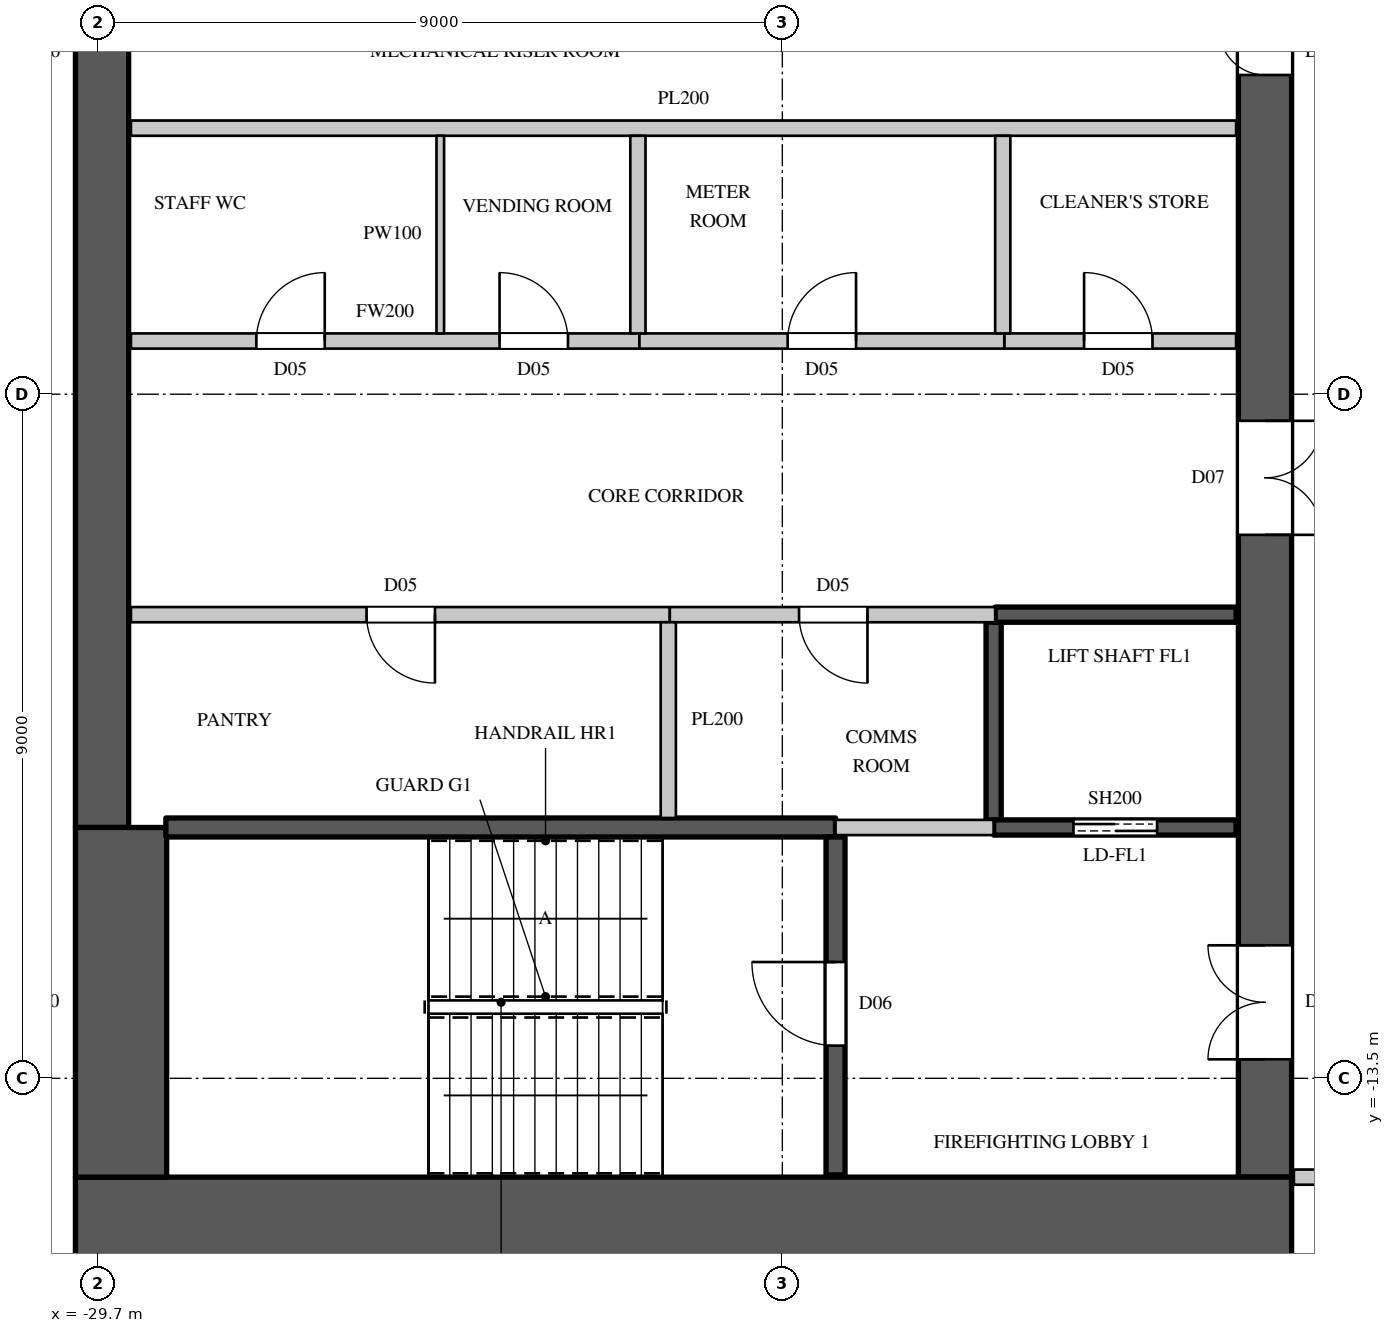
"""IFC4 building model, lengths in metres.
Left out: names, types, materials, properties, quantities, classifications, styles, units other than length and angle.
Written with IfcOpenShell. Run it as: python <this file> out.ifc"""

import sys

from ifc_helpers import new_model, si_unit, direction, frame, frame_2d, origin, place, context, subcontext, project, spatial, rectangle, extrude, element, fill, save


model = new_model("IFC4")
c1 = context("Model", 3, precision=1e-05, world=origin(), true_north=direction((0.0, 1.0)))
c2 = subcontext(c1, "Body", "Model", "MODEL_VIEW")
j1 = project(units=[si_unit("LENGTHUNIT", "METRE"), si_unit("PLANEANGLEUNIT", "RADIAN")], contexts=[c1])
p1 = place(None, origin())
s1 = spatial("IfcSite", under=j1, at=p1, CompositionType="ELEMENT")
p2 = place(p1, origin())
s2 = spatial("IfcBuilding", under=s1, at=p2, CompositionType="ELEMENT")
p3 = place(p2, frame((0.0, 0.0, 317.2)))
s3 = spatial("IfcBuildingStorey", under=s2, at=p3, CompositionType="ELEMENT", Elevation=317.2)
p4 = place(p3, frame((-30.0, -15.4, 0.0), z_axis=(0.0, 0.0, 1.0), x_axis=(1.0, 0.0, 0.0)))
e1 = element("IfcWall", 1, at=p4, inside=s3, PredefinedType="SHEAR", context=c2, shape_type="SweptSolid", body=[
    extrude(rectangle(XDim=16.0, YDim=1.2, at=frame_2d((8.0, 0.0))), origin(), (0.0, 0.0, 1.0), 4.1),
])
p5 = place(p3, frame((-14.35, -14.8, 0.0), z_axis=(0.0, 0.0, 1.0), x_axis=(0.0, 1.0, 0.0)))
e2 = element("IfcWall", 2, at=p5, inside=s3, PredefinedType="SHEAR", context=c2, shape_type="SweptSolid", body=[
    extrude(rectangle(XDim=29.6, YDim=0.7, at=frame_2d((14.8, 0.0))), origin(), (0.0, 0.0, 1.0), 4.1),
])
p6 = place(p5, frame((1.55, 0.0, 0.0)))
e3 = element("IfcOpeningElement", 3, at=p6, cuts=e2, PredefinedType="OPENING", context=c2, shape_type="SweptSolid", body=[
    extrude(rectangle(XDim=1.5, YDim=2.4, at=frame_2d((0.75, 1.2))), frame((0.0, 0.36, 0.0), z_axis=(0.0, -1.0, 0.0), x_axis=(1.0, 0.0, 0.0)), (0.0, 0.0, 1.0), 0.72),
])
p7 = place(p5, frame((26.55, 0.0, 0.0)))
e4 = element("IfcOpeningElement", 4, at=p7, cuts=e2, PredefinedType="OPENING", context=c2, shape_type="SweptSolid", body=[
    extrude(rectangle(XDim=1.5, YDim=2.4, at=frame_2d((0.75, 1.2))), frame((0.0, 0.36, 0.0), z_axis=(0.0, -1.0, 0.0), x_axis=(1.0, 0.0, 0.0)), (0.0, 0.0, 1.0), 0.72),
])
p8 = place(p5, frame((8.45, 0.0, 0.0)))
e5 = element("IfcOpeningElement", 5, at=p8, cuts=e2, PredefinedType="OPENING", context=c2, shape_type="SweptSolid", body=[
    extrude(rectangle(XDim=1.5, YDim=2.4, at=frame_2d((0.75, 1.2))), frame((0.0, 0.36, 0.0), z_axis=(0.0, -1.0, 0.0), x_axis=(1.0, 0.0, 0.0)), (0.0, 0.0, 1.0), 0.72),
])
p9 = place(p5, frame((19.65, 0.0, 0.0)))
e6 = element("IfcOpeningElement", 6, at=p9, cuts=e2, PredefinedType="OPENING", context=c2, shape_type="SweptSolid", body=[
    extrude(rectangle(XDim=1.5, YDim=2.4, at=frame_2d((0.75, 1.2))), frame((0.0, 0.36, 0.0), z_axis=(0.0, -1.0, 0.0), x_axis=(1.0, 0.0, 0.0)), (0.0, 0.0, 1.0), 0.72),
])
p10 = place(p5, frame((14.5, 0.0, 0.0)))
e7 = element("IfcOpeningElement", 7, at=p10, cuts=e2, PredefinedType="OPENING", context=c2, shape_type="SweptSolid", body=[
    extrude(rectangle(XDim=0.6, YDim=2.0, at=frame_2d((0.3, 1.0))), frame((0.0, 0.36, 0.0), z_axis=(0.0, -1.0, 0.0), x_axis=(1.0, 0.0, 0.0)), (0.0, 0.0, 1.0), 0.72),
])
p11 = place(p3, frame((-29.65, -10.2, 0.0), z_axis=(0.0, 0.0, 1.0), x_axis=(0.0, 1.0, 0.0)))
e8 = element("IfcWall", 8, at=p11, inside=s3, PredefinedType="SHEAR", context=c2, shape_type="SweptSolid", body=[
    extrude(rectangle(XDim=20.4, YDim=0.7, at=frame_2d((10.2, 0.0))), origin(), (0.0, 0.0, 1.0), 4.1),
])
p12 = place(p3, frame((-29.4, -14.8, 0.0), z_axis=(0.0, 0.0, 1.0), x_axis=(0.0, 1.0, 0.0)))
e9 = element("IfcWall", 9, at=p12, inside=s3, PredefinedType="SHEAR", context=c2, shape_type="SweptSolid", body=[
    extrude(rectangle(XDim=4.6, YDim=1.2, at=frame_2d((2.3, 0.0))), origin(), (0.0, 0.0, 1.0), 4.1),
])
p13 = place(p3, frame((-29.27, -7.4, 0.0), z_axis=(0.0, 0.0, 1.0), x_axis=(1.0, 0.0, 0.0)))
e10 = element("IfcWall", 10, at=p13, inside=s3, PredefinedType="PARTITIONING", context=c2, shape_type="SweptSolid", body=[
    extrude(rectangle(XDim=7.09, YDim=0.2, at=frame_2d((3.545, 0.0))), origin(), (0.0, 0.0, 1.0), 3.8),
])
p14 = place(p13, frame((3.1, 0.0, 0.0)))
e11 = element("IfcOpeningElement", 11, at=p14, cuts=e10, PredefinedType="OPENING", context=c2, shape_type="SweptSolid", body=[
    extrude(rectangle(XDim=0.9, YDim=2.2, at=frame_2d((0.45, 1.1))), frame((0.0, 0.11, 0.0), z_axis=(0.0, -1.0, 0.0), x_axis=(1.0, 0.0, 0.0)), (0.0, 0.0, 1.0), 0.22),
])
p15 = place(p3, frame((-29.27, -3.8, 0.0), z_axis=(0.0, 0.0, 1.0), x_axis=(1.0, 0.0, 0.0)))
e12 = element("IfcWall", 12, at=p15, inside=s3, PredefinedType="PARTITIONING", context=c2, shape_type="SweptSolid", body=[
    extrude(rectangle(XDim=6.69, YDim=0.2, at=frame_2d((3.345, 0.0))), origin(), (0.0, 0.0, 1.0), 3.8),
])
p16 = place(p15, frame((1.65, 0.0, 0.0)))
e13 = element("IfcOpeningElement", 13, at=p16, cuts=e12, PredefinedType="OPENING", context=c2, shape_type="SweptSolid", body=[
    extrude(rectangle(XDim=0.9, YDim=2.2, at=frame_2d((0.45, 1.1))), frame((0.0, 0.11, 0.0), z_axis=(0.0, -1.0, 0.0), x_axis=(1.0, 0.0, 0.0)), (0.0, 0.0, 1.0), 0.22),
])
p17 = place(p15, frame((4.85, 0.0, 0.0)))
e14 = element("IfcOpeningElement", 14, at=p17, cuts=e12, PredefinedType="OPENING", context=c2, shape_type="SweptSolid", body=[
    extrude(rectangle(XDim=0.9, YDim=2.2, at=frame_2d((0.45, 1.1))), frame((0.0, 0.11, 0.0), z_axis=(0.0, -1.0, 0.0), x_axis=(1.0, 0.0, 0.0)), (0.0, 0.0, 1.0), 0.22),
])
p18 = place(p3, frame((-17.78, -3.8, 0.0), z_axis=(0.0, 0.0, 1.0), x_axis=(1.0, 0.0, 0.0)))
e15 = element("IfcWall", 15, at=p18, inside=s3, PredefinedType="PARTITIONING", context=c2, shape_type="SweptSolid", body=[
    extrude(rectangle(XDim=3.05, YDim=0.2, at=frame_2d((1.525, 0.0))), origin(), (0.0, 0.0, 1.0), 3.8),
])
p19 = place(p18, frame((1.05, 0.0, 0.0)))
e16 = element("IfcOpeningElement", 16, at=p19, cuts=e15, PredefinedType="OPENING", context=c2, shape_type="SweptSolid", body=[
    extrude(rectangle(XDim=0.9, YDim=2.2, at=frame_2d((0.45, 1.1))), frame((0.0, 0.11, 0.0), z_axis=(0.0, -1.0, 0.0), x_axis=(1.0, 0.0, 0.0)), (0.0, 0.0, 1.0), 0.22),
])
p20 = place(p3, frame((-13.97, -14.8, 0.0), z_axis=(0.0, 0.0, 1.0), x_axis=(1.0, 0.0, 0.0)))
e17 = element("IfcWall", 17, at=p20, inside=s3, PredefinedType="PARTITIONING", context=c2, shape_type="SweptSolid", body=[
    extrude(rectangle(XDim=2.87, YDim=0.2, at=frame_2d((1.435, 0.0))), origin(), (0.0, 0.0, 1.0), 3.8),
])
p21 = place(p3, frame((-29.27, -1.0, 0.0), z_axis=(0.0, 0.0, 1.0), x_axis=(1.0, 0.0, 0.0)))
e18 = element("IfcWall", 18, at=p21, inside=s3, PredefinedType="PARTITIONING", context=c2, shape_type="SweptSolid", body=[
    extrude(rectangle(XDim=14.54, YDim=0.2, at=frame_2d((7.27, 0.0))), origin(), (0.0, 0.0, 1.0), 3.8),
])
p22 = place(p3, frame((-22.58, -3.8, 0.0), z_axis=(0.0, 0.0, 1.0), x_axis=(1.0, 0.0, 0.0)))
e19 = element("IfcWall", 19, at=p22, inside=s3, PredefinedType="PARTITIONING", context=c2, shape_type="SweptSolid", body=[
    extrude(rectangle(XDim=4.8, YDim=0.2, at=frame_2d((2.4, 0.0))), origin(), (0.0, 0.0, 1.0), 3.8),
])
p23 = place(p22, frame((1.95, 0.0, 0.0)))
e20 = element("IfcOpeningElement", 20, at=p23, cuts=e19, PredefinedType="OPENING", context=c2, shape_type="SweptSolid", body=[
    extrude(rectangle(XDim=0.9, YDim=2.2, at=frame_2d((0.45, 1.1))), frame((0.0, 0.11, 0.0), z_axis=(0.0, -1.0, 0.0), x_axis=(1.0, 0.0, 0.0)), (0.0, 0.0, 1.0), 0.22),
])
p24 = place(p3, frame((-22.6, -3.7, 0.0), z_axis=(0.0, 0.0, 1.0), x_axis=(0.0, 1.0, 0.0)))
e21 = element("IfcWall", 21, at=p24, inside=s3, PredefinedType="PARTITIONING", context=c2, shape_type="SweptSolid", body=[
    extrude(rectangle(XDim=2.6, YDim=0.2, at=frame_2d((1.3, 0.0))), origin(), (0.0, 0.0, 1.0), 3.8),
])
p25 = place(p3, frame((-22.18, -7.4, 0.0), z_axis=(0.0, 0.0, 1.0), x_axis=(1.0, 0.0, 0.0)))
e22 = element("IfcWall", 22, at=p25, inside=s3, PredefinedType="PARTITIONING", context=c2, shape_type="SweptSolid", body=[
    extrude(rectangle(XDim=4.28, YDim=0.2, at=frame_2d((2.14, 0.0))), origin(), (0.0, 0.0, 1.0), 3.8),
])
p26 = place(p25, frame((1.7, 0.0, 0.0)))
e23 = element("IfcOpeningElement", 23, at=p26, cuts=e22, PredefinedType="OPENING", context=c2, shape_type="SweptSolid", body=[
    extrude(rectangle(XDim=0.9, YDim=2.2, at=frame_2d((0.45, 1.1))), frame((0.0, 0.11, 0.0), z_axis=(0.0, -1.0, 0.0), x_axis=(1.0, 0.0, 0.0)), (0.0, 0.0, 1.0), 0.22),
])
p27 = place(p3, frame((-22.2, -10.075, 0.0), z_axis=(0.0, 0.0, 1.0), x_axis=(0.0, 1.0, 0.0)))
e24 = element("IfcWall", 24, at=p27, inside=s3, PredefinedType="PARTITIONING", context=c2, shape_type="SweptSolid", body=[
    extrude(rectangle(XDim=2.575, YDim=0.2, at=frame_2d((1.288, 0.0))), origin(), (0.0, 0.0, 1.0), 3.8),
])
p28 = place(p3, frame((-20.0, -10.2, 0.0), z_axis=(0.0, 0.0, 1.0), x_axis=(1.0, 0.0, 0.0)))
e25 = element("IfcWall", 25, at=p28, inside=s3, PredefinedType="PARTITIONING", context=c2, shape_type="SweptSolid", body=[
    extrude(rectangle(XDim=2.08, YDim=0.2, at=frame_2d((1.04, 0.0))), origin(), (0.0, 0.0, 1.0), 3.8),
])
p29 = place(p3, frame((-17.8, -3.7, 0.0), z_axis=(0.0, 0.0, 1.0), x_axis=(0.0, 1.0, 0.0)))
e26 = element("IfcWall", 26, at=p29, inside=s3, PredefinedType="PARTITIONING", context=c2, shape_type="SweptSolid", body=[
    extrude(rectangle(XDim=2.6, YDim=0.2, at=frame_2d((1.3, 0.0))), origin(), (0.0, 0.0, 1.0), 3.8),
])
p30 = place(p3, frame((-17.92, -10.1, 0.0), z_axis=(0.0, 0.0, 1.0), x_axis=(0.0, 1.0, 0.0)))
e27 = element("IfcWall", 27, at=p30, inside=s3, PredefinedType="SHEAR", context=c2, shape_type="SweptSolid", body=[
    extrude(rectangle(XDim=2.6, YDim=0.2, at=frame_2d((1.3, 0.0))), origin(), (0.0, 0.0, 1.0), 3.8),
])
p31 = place(p3, frame((-17.92, -10.2, 0.0), z_axis=(0.0, 0.0, 1.0), x_axis=(1.0, 0.0, 0.0)))
e28 = element("IfcWall", 28, at=p31, inside=s3, PredefinedType="SHEAR", context=c2, shape_type="SweptSolid", body=[
    extrude(rectangle(XDim=3.19, YDim=0.2, at=frame_2d((1.595, 0.0))), origin(), (0.0, 0.0, 1.0), 3.8),
])
p32 = place(p31, frame((1.05, 0.0, 0.0)))
e29 = element("IfcOpeningElement", 29, at=p32, cuts=e28, PredefinedType="OPENING", context=c2, shape_type="SweptSolid", body=[
    extrude(rectangle(XDim=1.1, YDim=2.2, at=frame_2d((0.55, 1.1))), frame((0.0, 0.11, 0.0), z_axis=(0.0, -1.0, 0.0), x_axis=(1.0, 0.0, 0.0)), (0.0, 0.0, 1.0), 0.22),
])
p33 = place(p3, frame((-17.9, -7.4, 0.0), z_axis=(0.0, 0.0, 1.0), x_axis=(1.0, 0.0, 0.0)))
e30 = element("IfcWall", 30, at=p33, inside=s3, PredefinedType="SHEAR", context=c2, shape_type="SweptSolid", body=[
    extrude(rectangle(XDim=3.17, YDim=0.2, at=frame_2d((1.585, 0.0))), origin(), (0.0, 0.0, 1.0), 3.8),
])
p34 = place(p3, frame((-28.81, -10.2, 0.0), z_axis=(0.0, 0.0, 1.0), x_axis=(1.0, 0.0, 0.0)))
e31 = element("IfcWall", 31, at=p34, inside=s3, PredefinedType="SHEAR", context=c2, shape_type="SweptSolid", body=[
    extrude(rectangle(XDim=8.81, YDim=0.25, at=frame_2d((4.405, 0.0))), origin(), (0.0, 0.0, 1.0), 3.8),
])
p35 = place(p3, frame((-20.0, -14.77, 0.0), z_axis=(0.0, 0.0, 1.0), x_axis=(0.0, 1.0, 0.0)))
e32 = element("IfcWall", 32, at=p35, inside=s3, PredefinedType="SHEAR", context=c2, shape_type="SweptSolid", body=[
    extrude(rectangle(XDim=4.445, YDim=0.25, at=frame_2d((2.223, 0.0))), origin(), (0.0, 0.0, 1.0), 3.8),
])
p36 = place(p35, frame((1.7, 0.0, 0.0)))
e33 = element("IfcOpeningElement", 33, at=p36, cuts=e32, PredefinedType="OPENING", context=c2, shape_type="SweptSolid", body=[
    extrude(rectangle(XDim=1.1, YDim=2.2, at=frame_2d((0.55, 1.1))), frame((0.0, 0.135, 0.0), z_axis=(0.0, -1.0, 0.0), x_axis=(1.0, 0.0, 0.0)), (0.0, 0.0, 1.0), 0.27),
])
p37 = place(p3, frame((-25.2, -3.7, 0.0), z_axis=(0.0, 0.0, 1.0), x_axis=(0.0, 1.0, 0.0)))
e34 = element("IfcWall", 34, at=p37, inside=s3, PredefinedType="PARTITIONING", context=c2, shape_type="SweptSolid", body=[
    extrude(rectangle(XDim=2.6, YDim=0.1, at=frame_2d((1.3, 0.0))), origin(), (0.0, 0.0, 1.0), 3.8),
])
p38 = place(p36, origin())
e35 = element("IfcDoor", 35, at=p38, inside=s3, OperationType="SINGLE_SWING_RIGHT", PredefinedType="DOOR", context=c2, shape_type="SweptSolid", body=[
    extrude(rectangle(XDim=1.1, YDim=2.2, at=frame_2d((0.55, 1.1))), frame((0.0, 0.025, 0.0), z_axis=(0.0, -1.0, 0.0), x_axis=(1.0, 0.0, 0.0)), (0.0, 0.0, 1.0), 0.05),
])
fill(e33, e35)
p39 = place(p14, origin())
e36 = element("IfcDoor", 36, at=p39, inside=s3, OperationType="SINGLE_SWING_LEFT", PredefinedType="DOOR", context=c2, shape_type="SweptSolid", body=[
    extrude(rectangle(XDim=0.9, YDim=2.2, at=frame_2d((0.45, 1.1))), frame((0.0, 0.025, 0.0), z_axis=(0.0, -1.0, 0.0), x_axis=(1.0, 0.0, 0.0)), (0.0, 0.0, 1.0), 0.05),
])
fill(e11, e36)
p40 = place(p26, origin())
e37 = element("IfcDoor", 37, at=p40, inside=s3, OperationType="SINGLE_SWING_LEFT", PredefinedType="DOOR", context=c2, shape_type="SweptSolid", body=[
    extrude(rectangle(XDim=0.9, YDim=2.2, at=frame_2d((0.45, 1.1))), frame((0.0, 0.025, 0.0), z_axis=(0.0, -1.0, 0.0), x_axis=(1.0, 0.0, 0.0)), (0.0, 0.0, 1.0), 0.05),
])
fill(e23, e37)
p41 = place(p16, origin())
e38 = element("IfcDoor", 38, at=p41, inside=s3, OperationType="SINGLE_SWING_RIGHT", PredefinedType="DOOR", context=c2, shape_type="SweptSolid", body=[
    extrude(rectangle(XDim=0.9, YDim=2.2, at=frame_2d((0.45, 1.1))), frame((0.0, 0.025, 0.0), z_axis=(0.0, -1.0, 0.0), x_axis=(1.0, 0.0, 0.0)), (0.0, 0.0, 1.0), 0.05),
])
fill(e13, e38)
p42 = place(p17, origin())
e39 = element("IfcDoor", 39, at=p42, inside=s3, OperationType="SINGLE_SWING_LEFT", PredefinedType="DOOR", context=c2, shape_type="SweptSolid", body=[
    extrude(rectangle(XDim=0.9, YDim=2.2, at=frame_2d((0.45, 1.1))), frame((0.0, 0.025, 0.0), z_axis=(0.0, -1.0, 0.0), x_axis=(1.0, 0.0, 0.0)), (0.0, 0.0, 1.0), 0.05),
])
fill(e14, e39)
p43 = place(p23, origin())
e40 = element("IfcDoor", 40, at=p43, inside=s3, OperationType="SINGLE_SWING_RIGHT", PredefinedType="DOOR", context=c2, shape_type="SweptSolid", body=[
    extrude(rectangle(XDim=0.9, YDim=2.2, at=frame_2d((0.45, 1.1))), frame((0.0, 0.025, 0.0), z_axis=(0.0, -1.0, 0.0), x_axis=(1.0, 0.0, 0.0)), (0.0, 0.0, 1.0), 0.05),
])
fill(e20, e40)
p44 = place(p19, origin())
e41 = element("IfcDoor", 41, at=p44, inside=s3, OperationType="SINGLE_SWING_LEFT", PredefinedType="DOOR", context=c2, shape_type="SweptSolid", body=[
    extrude(rectangle(XDim=0.9, YDim=2.2, at=frame_2d((0.45, 1.1))), frame((0.0, 0.025, 0.0), z_axis=(0.0, -1.0, 0.0), x_axis=(1.0, 0.0, 0.0)), (0.0, 0.0, 1.0), 0.05),
])
fill(e16, e41)
p45 = place(p32, origin())
e42 = element("IfcDoor", 42, at=p45, inside=s3, OperationType="DOUBLE_DOOR_SLIDING", PredefinedType="DOOR", context=c2, shape_type="SweptSolid", body=[
    extrude(rectangle(XDim=1.1, YDim=2.2, at=frame_2d((0.55, 1.1))), frame((0.0, 0.025, 0.0), z_axis=(0.0, -1.0, 0.0), x_axis=(1.0, 0.0, 0.0)), (0.0, 0.0, 1.0), 0.05),
])
fill(e29, e42)
p46 = place(p6, origin())
e43 = element("IfcDoor", 43, at=p46, inside=s3, OperationType="DOUBLE_DOOR_SINGLE_SWING", PredefinedType="DOOR", context=c2, shape_type="SweptSolid", body=[
    extrude(rectangle(XDim=1.5, YDim=2.4, at=frame_2d((0.75, 1.2))), frame((0.0, 0.345, 0.0), z_axis=(0.0, -1.0, 0.0), x_axis=(1.0, 0.0, 0.0)), (0.0, 0.0, 1.0), 0.05),
])
fill(e3, e43)
p47 = place(p8, origin())
e44 = element("IfcDoor", 44, at=p47, inside=s3, OperationType="DOUBLE_DOOR_SINGLE_SWING", PredefinedType="DOOR", context=c2, shape_type="SweptSolid", body=[
    extrude(rectangle(XDim=1.5, YDim=2.4, at=frame_2d((0.75, 1.2))), frame((0.0, -0.295, 0.0), z_axis=(0.0, -1.0, 0.0), x_axis=(1.0, 0.0, 0.0)), (0.0, 0.0, 1.0), 0.05),
])
fill(e5, e44)
p48 = place(p10, origin())
e45 = element("IfcDoor", 45, at=p48, inside=s3, OperationType="SINGLE_SWING_RIGHT", PredefinedType="DOOR", context=c2, shape_type="SweptSolid", body=[
    extrude(rectangle(XDim=0.6, YDim=2.0, at=frame_2d((0.3, 1.0))), frame((0.0, 0.345, 0.0), z_axis=(0.0, -1.0, 0.0), x_axis=(1.0, 0.0, 0.0)), (0.0, 0.0, 1.0), 0.05),
])
fill(e7, e45)
save(model, sys.argv[1])
